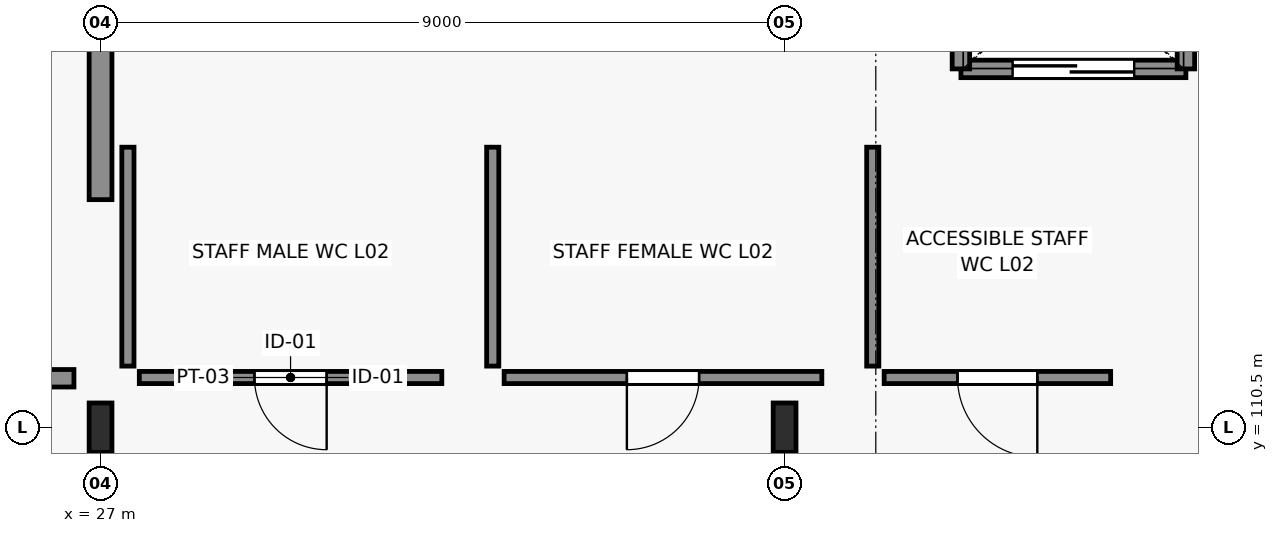
"""IFC4 building model, lengths in metres.
Left out: names, types, materials, properties, quantities, classifications, styles, units other than length and angle.
Written with IfcOpenShell. Run it as: python <this file> out.ifc"""

import sys

from ifc_helpers import new_model, si_unit, direction, frame, frame_2d, origin, origin_2d, place, context, subcontext, project, spatial, rectangle, i_section, extrude, element, fill, save


model = new_model("IFC4")
c1 = context("Model", 3, precision=1e-05, world=origin(), true_north=direction((0.0, 1.0)))
c2 = subcontext(c1, "Body", "Model", "MODEL_VIEW")
j1 = project(units=[si_unit("LENGTHUNIT", "METRE"), si_unit("PLANEANGLEUNIT", "RADIAN")], contexts=[c1])
p1 = place(None, origin())
s1 = spatial("IfcSite", under=j1, at=p1, CompositionType="ELEMENT")
p2 = place(p1, origin())
s2 = spatial("IfcBuilding", under=s1, at=p2, CompositionType="ELEMENT")
p3 = place(p2, frame((0.0, 0.0, 9.8)))
s3 = spatial("IfcBuildingStorey", under=s2, at=p3, CompositionType="ELEMENT", Elevation=9.8)
for number, where, z_axis, x_axis in (
    (1, (27.0, 110.5, 0.0), (0.0, 0.0, 1.0), (1.0, 0.0, 0.0)),
    (2, (36.0, 110.5, 0.0), (0.0, 0.0, 1.0), (1.0, 0.0, 0.0)),
):
    element("IfcColumn", number, at=place(p3, frame(where, z_axis=z_axis, x_axis=x_axis)), inside=s3, PredefinedType="COLUMN", context=c2, shape_type="SweptSolid", body=[
        extrude(i_section(OverallWidth=0.3, OverallDepth=0.65, WebThickness=0.016, FlangeThickness=0.031, FilletRadius=0.027, at=origin_2d()), origin(), (0.0, 0.0, 1.0), 5.0),
    ])
p4 = place(p3, frame((27.0, 113.5, 0.0), z_axis=(0.0, 0.0, 1.0), x_axis=(0.0, 1.0, 0.0)))
e3 = element("IfcWall", 3, at=p4, inside=s3, PredefinedType="SHEAR", context=c2, shape_type="SweptSolid", body=[
    extrude(rectangle(XDim=4.825, YDim=0.3, at=frame_2d((2.413, 0.0))), origin(), (0.0, 0.0, 1.0), 5.0),
])
p5 = place(p3, frame((31.49, 111.16, 0.0), z_axis=(0.0, 0.0, 1.0), x_axis=(-1.0, 0.0, 0.0)))
e4 = element("IfcWall", 4, at=p5, inside=s3, PredefinedType="PARTITIONING", context=c2, shape_type="SweptSolid", body=[
    extrude(rectangle(XDim=3.98, YDim=0.16, at=frame_2d((1.99, 0.0))), origin(), (0.0, 0.0, 1.0), 4.73),
])
p6 = place(p5, frame((1.515, 0.0, 0.0)))
e5 = element("IfcOpeningElement", 5, at=p6, cuts=e4, PredefinedType="OPENING", context=c2, shape_type="SweptSolid", body=[
    extrude(rectangle(XDim=0.95, YDim=2.15, at=frame_2d((0.475, 1.075))), frame((0.0, 0.09, 0.0), z_axis=(0.0, -1.0, 0.0), x_axis=(1.0, 0.0, 0.0)), (0.0, 0.0, 1.0), 0.18),
])
p7 = place(p3, frame((27.36, 111.31, 0.0), z_axis=(0.0, 0.0, 1.0), x_axis=(0.0, 1.0, 0.0)))
e6 = element("IfcWall", 6, at=p7, inside=s3, PredefinedType="PARTITIONING", context=c2, shape_type="SweptSolid", body=[
    extrude(rectangle(XDim=2.88, YDim=0.16, at=frame_2d((1.44, 0.0))), origin(), (0.0, 0.0, 1.0), 4.95),
])
p8 = place(p3, frame((36.49, 111.16, 0.0), z_axis=(0.0, 0.0, 1.0), x_axis=(-1.0, 0.0, 0.0)))
e7 = element("IfcWall", 7, at=p8, inside=s3, PredefinedType="PARTITIONING", context=c2, shape_type="SweptSolid", body=[
    extrude(rectangle(XDim=4.18, YDim=0.16, at=frame_2d((2.09, 0.0))), origin(), (0.0, 0.0, 1.0), 4.53),
])
p9 = place(p8, frame((1.615, 0.0, 0.0)))
e8 = element("IfcOpeningElement", 8, at=p9, cuts=e7, PredefinedType="OPENING", context=c2, shape_type="SweptSolid", body=[
    extrude(rectangle(XDim=0.95, YDim=2.15, at=frame_2d((0.475, 1.075))), frame((0.0, 0.09, 0.0), z_axis=(0.0, -1.0, 0.0), x_axis=(1.0, 0.0, 0.0)), (0.0, 0.0, 1.0), 0.18),
])
p10 = place(p3, frame((32.16, 111.31, 0.0), z_axis=(0.0, 0.0, 1.0), x_axis=(0.0, 1.0, 0.0)))
e9 = element("IfcWall", 9, at=p10, inside=s3, PredefinedType="PARTITIONING", context=c2, shape_type="SweptSolid", body=[
    extrude(rectangle(XDim=2.88, YDim=0.16, at=frame_2d((1.44, 0.0))), origin(), (0.0, 0.0, 1.0), 4.95),
])
p11 = place(p3, frame((40.29, 111.16, 0.0), z_axis=(0.0, 0.0, 1.0), x_axis=(-1.0, 0.0, 0.0)))
e10 = element("IfcWall", 10, at=p11, inside=s3, PredefinedType="PARTITIONING", context=c2, shape_type="SweptSolid", body=[
    extrude(rectangle(XDim=2.98, YDim=0.16, at=frame_2d((1.49, 0.0))), origin(), (0.0, 0.0, 1.0), 4.73),
])
p12 = place(p11, frame((0.965, 0.0, 0.0)))
e11 = element("IfcOpeningElement", 11, at=p12, cuts=e10, PredefinedType="OPENING", context=c2, shape_type="SweptSolid", body=[
    extrude(rectangle(XDim=1.05, YDim=2.2, at=frame_2d((0.525, 1.1))), frame((0.0, 0.09, 0.0), z_axis=(0.0, -1.0, 0.0), x_axis=(1.0, 0.0, 0.0)), (0.0, 0.0, 1.0), 0.18),
])
p13 = place(p3, frame((37.16, 111.31, 0.0), z_axis=(0.0, 0.0, 1.0), x_axis=(0.0, 1.0, 0.0)))
e12 = element("IfcWall", 12, at=p13, inside=s3, PredefinedType="PARTITIONING", context=c2, shape_type="SweptSolid", body=[
    extrude(rectangle(XDim=2.88, YDim=0.16, at=frame_2d((1.44, 0.0))), origin(), (0.0, 0.0, 1.0), 4.95),
])
p14 = place(p3, frame((41.28, 115.22, 0.0), z_axis=(0.0, 0.0, 1.0), x_axis=(-1.0, 0.0, 0.0)))
e13 = element("IfcWall", 13, at=p14, inside=s3, PredefinedType="SOLIDWALL", context=c2, shape_type="SweptSolid", body=[
    extrude(rectangle(XDim=2.96, YDim=0.23, at=frame_2d((1.48, 0.0))), origin(), (0.0, 0.0, 1.0), 4.73),
])
p15 = place(p14, frame((0.68, 0.0, 0.0)))
e14 = element("IfcOpeningElement", 14, at=p15, cuts=e13, PredefinedType="OPENING", context=c2, shape_type="SweptSolid", body=[
    extrude(rectangle(XDim=1.6, YDim=2.3, at=frame_2d((0.8, 1.15))), frame((0.0, 0.125, 0.0), z_axis=(0.0, -1.0, 0.0), x_axis=(1.0, 0.0, 0.0)), (0.0, 0.0, 1.0), 0.25),
])
for number, where, z_axis, x_axis in (
    (15, (38.32, 115.22, 0.0), (0.0, 0.0, 1.0), (0.0, 1.0, 0.0)),
    (16, (41.28, 117.78, 0.0), (0.0, 0.0, 1.0), (0.0, -1.0, 0.0)),
):
    element("IfcWall", number, at=place(p3, frame(where, z_axis=z_axis, x_axis=x_axis)), inside=s3, PredefinedType="SOLIDWALL", context=c2, shape_type="SweptSolid", body=[
        extrude(rectangle(XDim=2.56, YDim=0.23, at=frame_2d((1.28, 0.0))), origin(), (0.0, 0.0, 1.0), 4.96),
    ])
p16 = place(p3, frame((15.3, 111.15, 0.0), z_axis=(0.0, 0.0, 1.0), x_axis=(1.0, 0.0, 0.0)))
e17 = element("IfcWall", 17, at=p16, inside=s3, PredefinedType="SOLIDWALL", context=c2, shape_type="SweptSolid", body=[
    extrude(rectangle(XDim=11.35, YDim=0.23, at=frame_2d((5.675, 0.0))), origin(), (0.0, 0.0, 1.0), 4.53),
])
p17 = place(p16, frame((0.55, 0.0, 0.0)))
e18 = element("IfcOpeningElement", 18, at=p17, cuts=e17, PredefinedType="OPENING", context=c2, shape_type="SweptSolid", body=[
    extrude(rectangle(XDim=1.8, YDim=2.3, at=frame_2d((0.9, 1.15))), frame((0.0, 0.125, 0.0), z_axis=(0.0, -1.0, 0.0), x_axis=(1.0, 0.0, 0.0)), (0.0, 0.0, 1.0), 0.25),
])
p18 = place(p6, origin())
e19 = element("IfcDoor", 19, at=p18, inside=s3, OperationType="SINGLE_SWING_LEFT", PredefinedType="DOOR", context=c2, shape_type="SweptSolid", body=[
    extrude(rectangle(XDim=0.95, YDim=2.15, at=frame_2d((0.475, 1.075))), frame((0.0, 0.025, 0.0), z_axis=(0.0, -1.0, 0.0), x_axis=(1.0, 0.0, 0.0)), (0.0, 0.0, 1.0), 0.05),
])
fill(e5, e19)
p19 = place(p9, origin())
e20 = element("IfcDoor", 20, at=p19, inside=s3, OperationType="SINGLE_SWING_RIGHT", PredefinedType="DOOR", context=c2, shape_type="SweptSolid", body=[
    extrude(rectangle(XDim=0.95, YDim=2.15, at=frame_2d((0.475, 1.075))), frame((0.0, 0.025, 0.0), z_axis=(0.0, -1.0, 0.0), x_axis=(1.0, 0.0, 0.0)), (0.0, 0.0, 1.0), 0.05),
])
fill(e8, e20)
p20 = place(p12, origin())
e21 = element("IfcDoor", 21, at=p20, inside=s3, OperationType="SINGLE_SWING_LEFT", PredefinedType="DOOR", context=c2, shape_type="SweptSolid", body=[
    extrude(rectangle(XDim=1.05, YDim=2.2, at=frame_2d((0.525, 1.1))), frame((0.0, 0.025, 0.0), z_axis=(0.0, -1.0, 0.0), x_axis=(1.0, 0.0, 0.0)), (0.0, 0.0, 1.0), 0.05),
])
fill(e11, e21)
p21 = place(p15, origin())
e22 = element("IfcDoor", 22, at=p21, inside=s3, OperationType="DOUBLE_DOOR_SLIDING", PredefinedType="DOOR", context=c2, shape_type="SweptSolid", body=[
    extrude(rectangle(XDim=1.6, YDim=2.3, at=frame_2d((0.8, 1.15))), frame((0.0, 0.025, 0.0), z_axis=(0.0, -1.0, 0.0), x_axis=(1.0, 0.0, 0.0)), (0.0, 0.0, 1.0), 0.05),
])
fill(e14, e22)
save(model, sys.argv[1])
